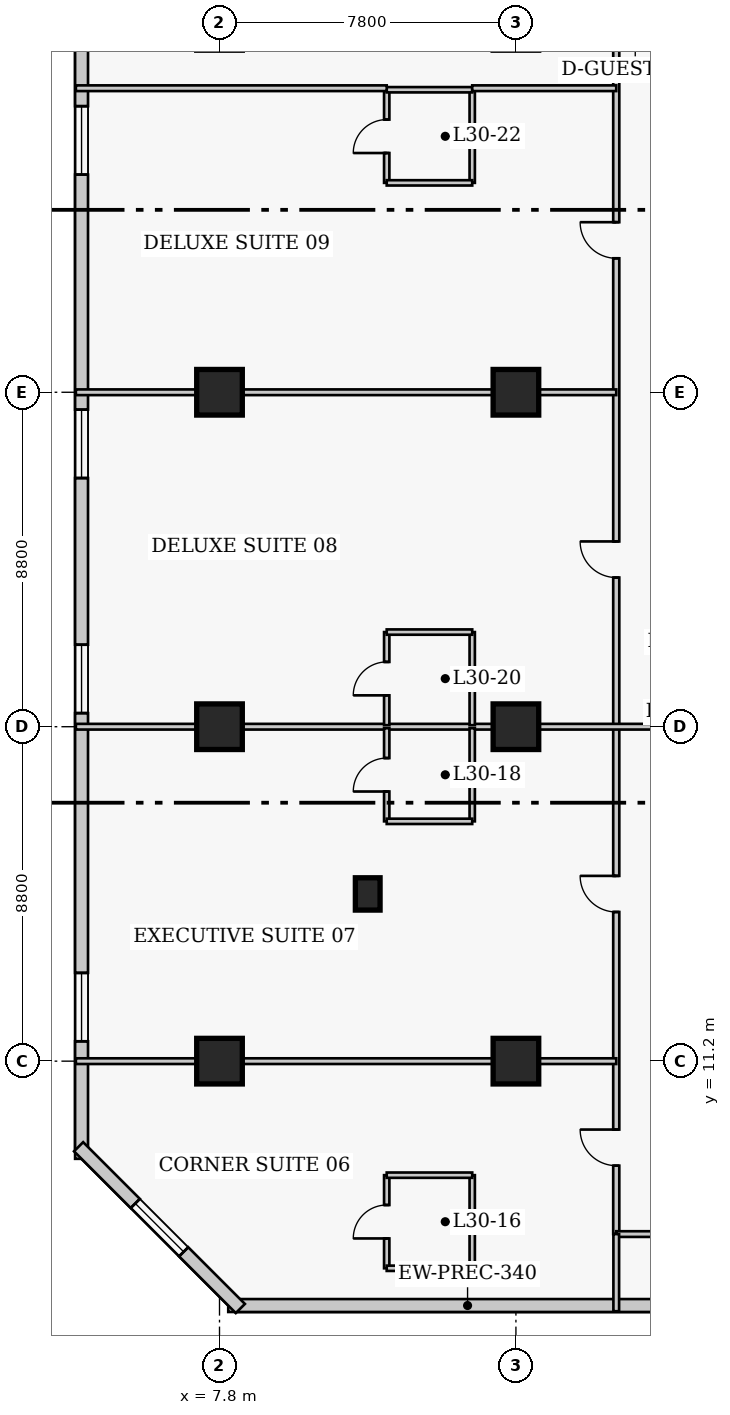
"""IFC4 building model, lengths in metres.
Left out: names, types, materials, properties, quantities, classifications, styles, units other than length and angle.
Written with IfcOpenShell. Run it as: python <this file> out.ifc"""

import sys

from ifc_helpers import new_model, si_unit, direction, frame, frame_2d, origin, origin_2d, place, context, subcontext, project, spatial, rectangle, extrude, element, fill, save


model = new_model("IFC4")
c1 = context("Model", 3, precision=1e-05, world=origin(), true_north=direction((0.0, 1.0)))
c2 = subcontext(c1, "Body", "Model", "MODEL_VIEW")
j1 = project(units=[si_unit("LENGTHUNIT", "METRE"), si_unit("PLANEANGLEUNIT", "RADIAN")], contexts=[c1])
p1 = place(None, origin())
s1 = spatial("IfcSite", under=j1, at=p1, CompositionType="ELEMENT")
p2 = place(p1, origin())
s2 = spatial("IfcBuilding", under=s1, at=p2, CompositionType="ELEMENT")
p3 = place(p2, frame((0.0, 0.0, 122.2)))
s3 = spatial("IfcBuildingStorey", under=s2, at=p3, CompositionType="ELEMENT", Elevation=122.2)
for number, where, z_axis, x_axis in (
    (1, (7.8, 11.2, 0.0), (0.0, 0.0, 1.0), (1.0, 0.0, 0.0)),
    (2, (7.8, 20.0, 0.0), (0.0, 0.0, 1.0), (1.0, 0.0, 0.0)),
    (3, (7.8, 28.8, 0.0), (0.0, 0.0, 1.0), (1.0, 0.0, 0.0)),
    (4, (15.6, 11.2, 0.0), (0.0, 0.0, 1.0), (1.0, 0.0, 0.0)),
    (5, (15.6, 20.0, 0.0), (0.0, 0.0, 1.0), (1.0, 0.0, 0.0)),
    (6, (15.6, 28.8, 0.0), (0.0, 0.0, 1.0), (1.0, 0.0, 0.0)),
):
    element("IfcColumn", number, at=place(p3, frame(where, z_axis=z_axis, x_axis=x_axis)), inside=s3, PredefinedType="COLUMN", context=c2, shape_type="SweptSolid", body=[
        extrude(rectangle(XDim=1.2, YDim=1.2, at=origin_2d()), origin(), (0.0, 0.0, 1.0), 3.8),
    ])
p4 = place(p3, frame((11.7, 15.6, 0.0), z_axis=(0.0, 0.0, 1.0), x_axis=(1.0, 0.0, 0.0)))
e7 = element("IfcColumn", 7, at=p4, inside=s3, PredefinedType="PILASTER", context=c2, shape_type="SweptSolid", body=[
    extrude(rectangle(XDim=0.65, YDim=0.85, at=origin_2d()), origin(), (0.0, 0.0, 1.0), 3.8),
])
p5 = place(p3, frame((8.03, 4.77, 0.0), z_axis=(0.0, 0.0, 1.0), x_axis=(1.0, 0.0, 0.0)))
e8 = element("IfcWall", 8, at=p5, inside=s3, PredefinedType="SOLIDWALL", context=c2, shape_type="SweptSolid", body=[
    extrude(rectangle(XDim=28.29, YDim=0.34, at=frame_2d((14.145, 0.0))), origin(), (0.0, 0.0, 1.0), 3.54),
])
p6 = place(p5, frame((12.595, 0.0, 0.85)))
e9 = element("IfcOpeningElement", 9, at=p6, cuts=e8, PredefinedType="OPENING", context=c2, shape_type="SweptSolid", body=[
    extrude(rectangle(XDim=1.8, YDim=1.8, at=frame_2d((0.9, 0.9))), frame((0.0, 0.18, 0.0), z_axis=(0.0, -1.0, 0.0), x_axis=(1.0, 0.0, 0.0)), (0.0, 0.0, 1.0), 0.36),
])
p7 = place(p5, frame((19.555, 0.0, 0.85)))
e10 = element("IfcOpeningElement", 10, at=p7, cuts=e8, PredefinedType="OPENING", context=c2, shape_type="SweptSolid", body=[
    extrude(rectangle(XDim=1.3, YDim=1.7, at=frame_2d((0.65, 0.85))), frame((0.0, 0.18, 0.0), z_axis=(0.0, -1.0, 0.0), x_axis=(1.0, 0.0, 0.0)), (0.0, 0.0, 1.0), 0.36),
])
p8 = place(p3, frame((4.17, 40.57, 0.0), z_axis=(0.0, 0.0, 1.0), x_axis=(0.0, -1.0, 0.0)))
e11 = element("IfcWall", 11, at=p8, inside=s3, PredefinedType="SOLIDWALL", context=c2, shape_type="SweptSolid", body=[
    extrude(rectangle(XDim=31.94, YDim=0.34, at=frame_2d((15.97, 0.0))), origin(), (0.0, 0.0, 1.0), 3.54),
])
p9 = place(p8, frame((4.242, 0.0, 0.85)))
e12 = element("IfcOpeningElement", 12, at=p9, cuts=e11, PredefinedType="OPENING", context=c2, shape_type="SweptSolid", body=[
    extrude(rectangle(XDim=1.8, YDim=1.8, at=frame_2d((0.9, 0.9))), frame((0.0, 0.18, 0.0), z_axis=(0.0, -1.0, 0.0), x_axis=(1.0, 0.0, 0.0)), (0.0, 0.0, 1.0), 0.36),
])
p10 = place(p8, frame((12.228, 0.0, 0.85)))
e13 = element("IfcOpeningElement", 13, at=p10, cuts=e11, PredefinedType="OPENING", context=c2, shape_type="SweptSolid", body=[
    extrude(rectangle(XDim=1.8, YDim=1.8, at=frame_2d((0.9, 0.9))), frame((0.0, 0.18, 0.0), z_axis=(0.0, -1.0, 0.0), x_axis=(1.0, 0.0, 0.0)), (0.0, 0.0, 1.0), 0.36),
])
p11 = place(p8, frame((18.413, 0.0, 0.85)))
e14 = element("IfcOpeningElement", 14, at=p11, cuts=e11, PredefinedType="OPENING", context=c2, shape_type="SweptSolid", body=[
    extrude(rectangle(XDim=1.8, YDim=1.8, at=frame_2d((0.9, 0.9))), frame((0.0, 0.18, 0.0), z_axis=(0.0, -1.0, 0.0), x_axis=(1.0, 0.0, 0.0)), (0.0, 0.0, 1.0), 0.36),
])
p12 = place(p8, frame((27.048, 0.0, 0.85)))
e15 = element("IfcOpeningElement", 15, at=p12, cuts=e11, PredefinedType="OPENING", context=c2, shape_type="SweptSolid", body=[
    extrude(rectangle(XDim=1.8, YDim=1.8, at=frame_2d((0.9, 0.9))), frame((0.0, 0.18, 0.0), z_axis=(0.0, -1.0, 0.0), x_axis=(1.0, 0.0, 0.0)), (0.0, 0.0, 1.0), 0.36),
])
p13 = place(p3, frame((4.092, 8.948, 0.0), z_axis=(0.0, 0.0, 1.0), x_axis=(0.707106781187, -0.707106781187, 0.0)))
e16 = element("IfcWall", 16, at=p13, inside=s3, PredefinedType="SOLIDWALL", context=c2, shape_type="SweptSolid", body=[
    extrude(rectangle(XDim=6.02, YDim=0.34, at=frame_2d((3.01, 0.0))), origin(), (0.0, 0.0, 1.0), 3.54),
])
p14 = place(p13, frame((2.11, 0.0, 0.85)))
e17 = element("IfcOpeningElement", 17, at=p14, cuts=e16, PredefinedType="OPENING", context=c2, shape_type="SweptSolid", body=[
    extrude(rectangle(XDim=1.8, YDim=1.8, at=frame_2d((0.9, 0.9))), frame((0.0, 0.18, 0.0), z_axis=(0.0, -1.0, 0.0), x_axis=(1.0, 0.0, 0.0)), (0.0, 0.0, 1.0), 0.36),
])
p15 = place(p3, frame((18.24, 6.65, 0.0), z_axis=(0.0, 0.0, 1.0), x_axis=(0.0, 1.0, 0.0)))
e18 = element("IfcWall", 18, at=p15, inside=s3, PredefinedType="PARTITIONING", context=c2, shape_type="SweptSolid", body=[
    extrude(rectangle(XDim=34.0, YDim=0.16, at=frame_2d((17.0, 0.0))), origin(), (0.0, 0.0, 1.0), 3.54),
])
p16 = place(p15, frame((1.8, 0.0, 0.0)))
e19 = element("IfcOpeningElement", 19, at=p16, cuts=e18, PredefinedType="OPENING", context=c2, shape_type="SweptSolid", body=[
    extrude(rectangle(XDim=0.95, YDim=2.1, at=frame_2d((0.475, 1.05))), frame((0.0, 0.09, 0.0), z_axis=(0.0, -1.0, 0.0), x_axis=(1.0, 0.0, 0.0)), (0.0, 0.0, 1.0), 0.18),
])
p17 = place(p15, frame((8.475, 0.0, 0.0)))
e20 = element("IfcOpeningElement", 20, at=p17, cuts=e18, PredefinedType="OPENING", context=c2, shape_type="SweptSolid", body=[
    extrude(rectangle(XDim=0.95, YDim=2.1, at=frame_2d((0.475, 1.05))), frame((0.0, 0.09, 0.0), z_axis=(0.0, -1.0, 0.0), x_axis=(1.0, 0.0, 0.0)), (0.0, 0.0, 1.0), 0.18),
])
p18 = place(p15, frame((17.275, 0.0, 0.0)))
e21 = element("IfcOpeningElement", 21, at=p18, cuts=e18, PredefinedType="OPENING", context=c2, shape_type="SweptSolid", body=[
    extrude(rectangle(XDim=0.95, YDim=2.1, at=frame_2d((0.475, 1.05))), frame((0.0, 0.09, 0.0), z_axis=(0.0, -1.0, 0.0), x_axis=(1.0, 0.0, 0.0)), (0.0, 0.0, 1.0), 0.18),
])
p19 = place(p15, frame((25.675, 0.0, 0.0)))
e22 = element("IfcOpeningElement", 22, at=p19, cuts=e18, PredefinedType="OPENING", context=c2, shape_type="SweptSolid", body=[
    extrude(rectangle(XDim=0.95, YDim=2.1, at=frame_2d((0.475, 1.05))), frame((0.0, 0.09, 0.0), z_axis=(0.0, -1.0, 0.0), x_axis=(1.0, 0.0, 0.0)), (0.0, 0.0, 1.0), 0.18),
])
p20 = place(p15, frame((31.63, 0.0, 0.0)))
e23 = element("IfcOpeningElement", 23, at=p20, cuts=e18, PredefinedType="OPENING", context=c2, shape_type="SweptSolid", body=[
    extrude(rectangle(XDim=1.0, YDim=2.15, at=frame_2d((0.5, 1.075))), frame((0.0, 0.09, 0.0), z_axis=(0.0, -1.0, 0.0), x_axis=(1.0, 0.0, 0.0)), (0.0, 0.0, 1.0), 0.18),
])
p21 = place(p3, frame((18.24, 6.65, 0.0), z_axis=(0.0, 0.0, 1.0), x_axis=(1.0, 0.0, 0.0)))
e24 = element("IfcWall", 24, at=p21, inside=s3, PredefinedType="PARTITIONING", context=c2, shape_type="SweptSolid", body=[
    extrude(rectangle(XDim=2.22, YDim=0.15, at=frame_2d((1.11, 0.0))), origin(), (0.0, 0.0, 1.0), 3.54),
])
p22 = place(p3, frame((18.24, 4.62, 0.0), z_axis=(0.0, 0.0, 1.0), x_axis=(0.0, 1.0, 0.0)))
e25 = element("IfcWall", 25, at=p22, inside=s3, PredefinedType="PARTITIONING", context=c2, shape_type="SweptSolid", body=[
    extrude(rectangle(XDim=2.03, YDim=0.15, at=frame_2d((1.015, 0.0))), origin(), (0.0, 0.0, 1.0), 3.54),
])
p23 = place(p3, frame((12.2, 5.75, 0.0), z_axis=(0.0, 0.0, 1.0), x_axis=(0.0, 1.0, 0.0)))
e26 = element("IfcWall", 26, at=p23, inside=s3, PredefinedType="PLUMBINGWALL", context=c2, shape_type="SweptSolid", body=[
    extrude(rectangle(XDim=2.45, YDim=0.14, at=frame_2d((1.225, 0.0))), origin(), (0.0, 0.0, 1.0), 3.54),
])
p24 = place(p23, frame((0.785, 0.0, 0.0)))
e27 = element("IfcOpeningElement", 27, at=p24, cuts=e26, PredefinedType="OPENING", context=c2, shape_type="SweptSolid", body=[
    extrude(rectangle(XDim=0.88, YDim=2.05, at=frame_2d((0.44, 1.025))), frame((0.0, 0.08, 0.0), z_axis=(0.0, -1.0, 0.0), x_axis=(1.0, 0.0, 0.0)), (0.0, 0.0, 1.0), 0.16),
])
p25 = place(p3, frame((14.45, 5.75, 0.0), z_axis=(0.0, 0.0, 1.0), x_axis=(0.0, 1.0, 0.0)))
e28 = element("IfcWall", 28, at=p25, inside=s3, PredefinedType="PLUMBINGWALL", context=c2, shape_type="SweptSolid", body=[
    extrude(rectangle(XDim=2.45, YDim=0.14, at=frame_2d((1.225, 0.0))), origin(), (0.0, 0.0, 1.0), 3.54),
])
for number, where, z_axis, x_axis in (
    (29, (12.2, 5.75, 0.0), (0.0, 0.0, 1.0), (1.0, 0.0, 0.0)),
    (30, (12.2, 8.2, 0.0), (0.0, 0.0, 1.0), (1.0, 0.0, 0.0)),
):
    element("IfcWall", number, at=place(p3, frame(where, z_axis=z_axis, x_axis=x_axis)), inside=s3, PredefinedType="PLUMBINGWALL", context=c2, shape_type="SweptSolid", body=[
        extrude(rectangle(XDim=2.25, YDim=0.14, at=frame_2d((1.125, 0.0))), origin(), (0.0, 0.0, 1.0), 3.54),
    ])
p26 = place(p3, frame((4.02, 11.2, 0.0), z_axis=(0.0, 0.0, 1.0), x_axis=(1.0, 0.0, 0.0)))
e31 = element("IfcWall", 31, at=p26, inside=s3, PredefinedType="PARTITIONING", context=c2, shape_type="SweptSolid", body=[
    extrude(rectangle(XDim=14.22, YDim=0.15, at=frame_2d((7.11, 0.0))), origin(), (0.0, 0.0, 1.0), 2.679),
])
p27 = place(p3, frame((4.02, 20.0, 0.0), z_axis=(0.0, 0.0, 1.0), x_axis=(1.0, 0.0, 0.0)))
e32 = element("IfcWall", 32, at=p27, inside=s3, PredefinedType="PARTITIONING", context=c2, shape_type="SweptSolid", body=[
    extrude(rectangle(XDim=16.17, YDim=0.15, at=frame_2d((8.085, 0.0))), origin(), (0.0, 0.0, 1.0), 2.679),
])
p28 = place(p3, frame((12.2, 17.51, 0.0), z_axis=(0.0, 0.0, 1.0), x_axis=(0.0, 1.0, 0.0)))
e33 = element("IfcWall", 33, at=p28, inside=s3, PredefinedType="PLUMBINGWALL", context=c2, shape_type="SweptSolid", body=[
    extrude(rectangle(XDim=2.45, YDim=0.14, at=frame_2d((1.225, 0.0))), origin(), (0.0, 0.0, 1.0), 3.54),
])
p29 = place(p28, frame((0.785, 0.0, 0.0)))
e34 = element("IfcOpeningElement", 34, at=p29, cuts=e33, PredefinedType="OPENING", context=c2, shape_type="SweptSolid", body=[
    extrude(rectangle(XDim=0.88, YDim=2.05, at=frame_2d((0.44, 1.025))), frame((0.0, 0.08, 0.0), z_axis=(0.0, -1.0, 0.0), x_axis=(1.0, 0.0, 0.0)), (0.0, 0.0, 1.0), 0.16),
])
p30 = place(p3, frame((14.45, 17.51, 0.0), z_axis=(0.0, 0.0, 1.0), x_axis=(0.0, 1.0, 0.0)))
e35 = element("IfcWall", 35, at=p30, inside=s3, PredefinedType="PLUMBINGWALL", context=c2, shape_type="SweptSolid", body=[
    extrude(rectangle(XDim=2.45, YDim=0.14, at=frame_2d((1.225, 0.0))), origin(), (0.0, 0.0, 1.0), 3.54),
])
p31 = place(p3, frame((12.2, 17.51, 0.0), z_axis=(0.0, 0.0, 1.0), x_axis=(1.0, 0.0, 0.0)))
e36 = element("IfcWall", 36, at=p31, inside=s3, PredefinedType="PLUMBINGWALL", context=c2, shape_type="SweptSolid", body=[
    extrude(rectangle(XDim=2.25, YDim=0.14, at=frame_2d((1.125, 0.0))), origin(), (0.0, 0.0, 1.0), 3.54),
])
p32 = place(p3, frame((12.2, 20.04, 0.0), z_axis=(0.0, 0.0, 1.0), x_axis=(0.0, 1.0, 0.0)))
e37 = element("IfcWall", 37, at=p32, inside=s3, PredefinedType="PLUMBINGWALL", context=c2, shape_type="SweptSolid", body=[
    extrude(rectangle(XDim=2.45, YDim=0.14, at=frame_2d((1.225, 0.0))), origin(), (0.0, 0.0, 1.0), 3.54),
])
p33 = place(p32, frame((0.785, 0.0, 0.0)))
e38 = element("IfcOpeningElement", 38, at=p33, cuts=e37, PredefinedType="OPENING", context=c2, shape_type="SweptSolid", body=[
    extrude(rectangle(XDim=0.88, YDim=2.05, at=frame_2d((0.44, 1.025))), frame((0.0, 0.08, 0.0), z_axis=(0.0, -1.0, 0.0), x_axis=(1.0, 0.0, 0.0)), (0.0, 0.0, 1.0), 0.16),
])
p34 = place(p3, frame((14.45, 20.04, 0.0), z_axis=(0.0, 0.0, 1.0), x_axis=(0.0, 1.0, 0.0)))
e39 = element("IfcWall", 39, at=p34, inside=s3, PredefinedType="PLUMBINGWALL", context=c2, shape_type="SweptSolid", body=[
    extrude(rectangle(XDim=2.45, YDim=0.14, at=frame_2d((1.225, 0.0))), origin(), (0.0, 0.0, 1.0), 3.54),
])
p35 = place(p3, frame((12.2, 22.49, 0.0), z_axis=(0.0, 0.0, 1.0), x_axis=(1.0, 0.0, 0.0)))
e40 = element("IfcWall", 40, at=p35, inside=s3, PredefinedType="PLUMBINGWALL", context=c2, shape_type="SweptSolid", body=[
    extrude(rectangle(XDim=2.25, YDim=0.14, at=frame_2d((1.125, 0.0))), origin(), (0.0, 0.0, 1.0), 3.54),
])
p36 = place(p3, frame((4.02, 28.8, 0.0), z_axis=(0.0, 0.0, 1.0), x_axis=(1.0, 0.0, 0.0)))
e41 = element("IfcWall", 41, at=p36, inside=s3, PredefinedType="PARTITIONING", context=c2, shape_type="SweptSolid", body=[
    extrude(rectangle(XDim=14.22, YDim=0.15, at=frame_2d((7.11, 0.0))), origin(), (0.0, 0.0, 1.0), 2.679),
])
p37 = place(p3, frame((12.2, 34.31, 0.0), z_axis=(0.0, 0.0, 1.0), x_axis=(0.0, 1.0, 0.0)))
e42 = element("IfcWall", 42, at=p37, inside=s3, PredefinedType="PLUMBINGWALL", context=c2, shape_type="SweptSolid", body=[
    extrude(rectangle(XDim=2.45, YDim=0.14, at=frame_2d((1.225, 0.0))), origin(), (0.0, 0.0, 1.0), 3.54),
])
p38 = place(p37, frame((0.785, 0.0, 0.0)))
e43 = element("IfcOpeningElement", 43, at=p38, cuts=e42, PredefinedType="OPENING", context=c2, shape_type="SweptSolid", body=[
    extrude(rectangle(XDim=0.88, YDim=2.05, at=frame_2d((0.44, 1.025))), frame((0.0, 0.08, 0.0), z_axis=(0.0, -1.0, 0.0), x_axis=(1.0, 0.0, 0.0)), (0.0, 0.0, 1.0), 0.16),
])
p39 = place(p3, frame((14.45, 34.31, 0.0), z_axis=(0.0, 0.0, 1.0), x_axis=(0.0, 1.0, 0.0)))
e44 = element("IfcWall", 44, at=p39, inside=s3, PredefinedType="PLUMBINGWALL", context=c2, shape_type="SweptSolid", body=[
    extrude(rectangle(XDim=2.45, YDim=0.14, at=frame_2d((1.225, 0.0))), origin(), (0.0, 0.0, 1.0), 3.54),
])
for number, where, z_axis, x_axis in (
    (45, (12.2, 34.31, 0.0), (0.0, 0.0, 1.0), (1.0, 0.0, 0.0)),
    (46, (12.2, 36.76, 0.0), (0.0, 0.0, 1.0), (1.0, 0.0, 0.0)),
):
    element("IfcWall", number, at=place(p3, frame(where, z_axis=z_axis, x_axis=x_axis)), inside=s3, PredefinedType="PLUMBINGWALL", context=c2, shape_type="SweptSolid", body=[
        extrude(rectangle(XDim=2.25, YDim=0.14, at=frame_2d((1.125, 0.0))), origin(), (0.0, 0.0, 1.0), 3.54),
    ])
p40 = place(p3, frame((4.02, 36.8, 0.0), z_axis=(0.0, 0.0, 1.0), x_axis=(1.0, 0.0, 0.0)))
e47 = element("IfcWall", 47, at=p40, inside=s3, PredefinedType="PARTITIONING", context=c2, shape_type="SweptSolid", body=[
    extrude(rectangle(XDim=8.18, YDim=0.15, at=frame_2d((4.09, 0.0))), origin(), (0.0, 0.0, 1.0), 3.54),
])
p41 = place(p3, frame((14.45, 36.8, 0.0), z_axis=(0.0, 0.0, 1.0), x_axis=(1.0, 0.0, 0.0)))
e48 = element("IfcWall", 48, at=p41, inside=s3, PredefinedType="PARTITIONING", context=c2, shape_type="SweptSolid", body=[
    extrude(rectangle(XDim=3.79, YDim=0.15, at=frame_2d((1.895, 0.0))), origin(), (0.0, 0.0, 1.0), 3.54),
])
p42 = place(p9, origin())
e49 = element("IfcWindow", 49, at=p42, inside=s3, PartitioningType="SINGLE_PANEL", PredefinedType="WINDOW", context=c2, shape_type="SweptSolid", body=[
    extrude(rectangle(XDim=1.8, YDim=1.8, at=frame_2d((0.9, 0.9))), frame((0.0, 0.03, 0.0), z_axis=(0.0, -1.0, 0.0), x_axis=(1.0, 0.0, 0.0)), (0.0, 0.0, 1.0), 0.06),
])
fill(e12, e49)
p43 = place(p10, origin())
e50 = element("IfcWindow", 50, at=p43, inside=s3, PartitioningType="SINGLE_PANEL", PredefinedType="WINDOW", context=c2, shape_type="SweptSolid", body=[
    extrude(rectangle(XDim=1.8, YDim=1.8, at=frame_2d((0.9, 0.9))), frame((0.0, 0.03, 0.0), z_axis=(0.0, -1.0, 0.0), x_axis=(1.0, 0.0, 0.0)), (0.0, 0.0, 1.0), 0.06),
])
fill(e13, e50)
p44 = place(p11, origin())
e51 = element("IfcWindow", 51, at=p44, inside=s3, PartitioningType="SINGLE_PANEL", PredefinedType="WINDOW", context=c2, shape_type="SweptSolid", body=[
    extrude(rectangle(XDim=1.8, YDim=1.8, at=frame_2d((0.9, 0.9))), frame((0.0, 0.03, 0.0), z_axis=(0.0, -1.0, 0.0), x_axis=(1.0, 0.0, 0.0)), (0.0, 0.0, 1.0), 0.06),
])
fill(e14, e51)
p45 = place(p12, origin())
e52 = element("IfcWindow", 52, at=p45, inside=s3, PartitioningType="SINGLE_PANEL", PredefinedType="WINDOW", context=c2, shape_type="SweptSolid", body=[
    extrude(rectangle(XDim=1.8, YDim=1.8, at=frame_2d((0.9, 0.9))), frame((0.0, 0.03, 0.0), z_axis=(0.0, -1.0, 0.0), x_axis=(1.0, 0.0, 0.0)), (0.0, 0.0, 1.0), 0.06),
])
fill(e15, e52)
p46 = place(p14, origin())
e53 = element("IfcWindow", 53, at=p46, inside=s3, PartitioningType="SINGLE_PANEL", PredefinedType="WINDOW", context=c2, shape_type="SweptSolid", body=[
    extrude(rectangle(XDim=1.8, YDim=1.8, at=frame_2d((0.9, 0.9))), frame((0.0, 0.03, 0.0), z_axis=(0.0, -1.0, 0.0), x_axis=(1.0, 0.0, 0.0)), (0.0, 0.0, 1.0), 0.06),
])
fill(e17, e53)
p47 = place(p24, origin())
e54 = element("IfcDoor", 54, at=p47, inside=s3, OperationType="SINGLE_SWING_LEFT", PredefinedType="DOOR", context=c2, shape_type="SweptSolid", body=[
    extrude(rectangle(XDim=0.88, YDim=2.05, at=frame_2d((0.44, 1.025))), frame((0.0, 0.025, 0.0), z_axis=(0.0, -1.0, 0.0), x_axis=(1.0, 0.0, 0.0)), (0.0, 0.0, 1.0), 0.05),
])
fill(e27, e54)
p48 = place(p16, origin())
e55 = element("IfcDoor", 55, at=p48, inside=s3, OperationType="SINGLE_SWING_RIGHT", PredefinedType="DOOR", context=c2, shape_type="SweptSolid", body=[
    extrude(rectangle(XDim=0.95, YDim=2.1, at=frame_2d((0.475, 1.05))), frame((0.0, 0.025, 0.0), z_axis=(0.0, -1.0, 0.0), x_axis=(1.0, 0.0, 0.0)), (0.0, 0.0, 1.0), 0.05),
])
fill(e19, e55)
p49 = place(p29, origin())
e56 = element("IfcDoor", 56, at=p49, inside=s3, OperationType="SINGLE_SWING_LEFT", PredefinedType="DOOR", context=c2, shape_type="SweptSolid", body=[
    extrude(rectangle(XDim=0.88, YDim=2.05, at=frame_2d((0.44, 1.025))), frame((0.0, 0.025, 0.0), z_axis=(0.0, -1.0, 0.0), x_axis=(1.0, 0.0, 0.0)), (0.0, 0.0, 1.0), 0.05),
])
fill(e34, e56)
p50 = place(p17, origin())
e57 = element("IfcDoor", 57, at=p50, inside=s3, OperationType="SINGLE_SWING_RIGHT", PredefinedType="DOOR", context=c2, shape_type="SweptSolid", body=[
    extrude(rectangle(XDim=0.95, YDim=2.1, at=frame_2d((0.475, 1.05))), frame((0.0, 0.025, 0.0), z_axis=(0.0, -1.0, 0.0), x_axis=(1.0, 0.0, 0.0)), (0.0, 0.0, 1.0), 0.05),
])
fill(e20, e57)
p51 = place(p33, origin())
e58 = element("IfcDoor", 58, at=p51, inside=s3, OperationType="SINGLE_SWING_LEFT", PredefinedType="DOOR", context=c2, shape_type="SweptSolid", body=[
    extrude(rectangle(XDim=0.88, YDim=2.05, at=frame_2d((0.44, 1.025))), frame((0.0, 0.025, 0.0), z_axis=(0.0, -1.0, 0.0), x_axis=(1.0, 0.0, 0.0)), (0.0, 0.0, 1.0), 0.05),
])
fill(e38, e58)
p52 = place(p18, origin())
e59 = element("IfcDoor", 59, at=p52, inside=s3, OperationType="SINGLE_SWING_RIGHT", PredefinedType="DOOR", context=c2, shape_type="SweptSolid", body=[
    extrude(rectangle(XDim=0.95, YDim=2.1, at=frame_2d((0.475, 1.05))), frame((0.0, 0.025, 0.0), z_axis=(0.0, -1.0, 0.0), x_axis=(1.0, 0.0, 0.0)), (0.0, 0.0, 1.0), 0.05),
])
fill(e21, e59)
p53 = place(p38, origin())
e60 = element("IfcDoor", 60, at=p53, inside=s3, OperationType="SINGLE_SWING_LEFT", PredefinedType="DOOR", context=c2, shape_type="SweptSolid", body=[
    extrude(rectangle(XDim=0.88, YDim=2.05, at=frame_2d((0.44, 1.025))), frame((0.0, 0.025, 0.0), z_axis=(0.0, -1.0, 0.0), x_axis=(1.0, 0.0, 0.0)), (0.0, 0.0, 1.0), 0.05),
])
fill(e43, e60)
p54 = place(p19, origin())
e61 = element("IfcDoor", 61, at=p54, inside=s3, OperationType="SINGLE_SWING_RIGHT", PredefinedType="DOOR", context=c2, shape_type="SweptSolid", body=[
    extrude(rectangle(XDim=0.95, YDim=2.1, at=frame_2d((0.475, 1.05))), frame((0.0, 0.025, 0.0), z_axis=(0.0, -1.0, 0.0), x_axis=(1.0, 0.0, 0.0)), (0.0, 0.0, 1.0), 0.05),
])
fill(e22, e61)
save(model, sys.argv[1])
